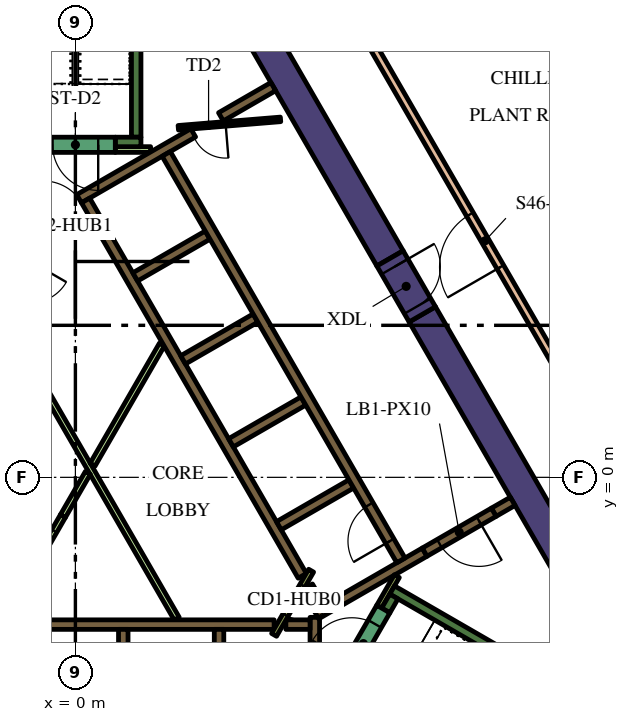
"""IFC4 building model, lengths in metres.
Left out: names, types, materials, properties, quantities, classifications, styles, units other than length and angle.
Written with IfcOpenShell. Run it as: python <this file> out.ifc"""

import sys

from ifc_helpers import new_model, si_unit, direction, frame, frame_2d, origin, place, context, subcontext, project, spatial, rectangle, extrude, element, fill, save


model = new_model("IFC4")
c1 = context("Model", 3, precision=1e-05, world=origin(), true_north=direction((0.0, 1.0)))
c2 = subcontext(c1, "Body", "Model", "MODEL_VIEW")
j1 = project(units=[si_unit("LENGTHUNIT", "METRE"), si_unit("PLANEANGLEUNIT", "RADIAN")], contexts=[c1])
p1 = place(None, origin())
s1 = spatial("IfcSite", under=j1, at=p1, CompositionType="ELEMENT")
p2 = place(p1, origin())
s2 = spatial("IfcBuilding", under=s1, at=p2, CompositionType="ELEMENT")
p3 = place(p2, frame((0.0, 0.0, 196.2)))
s3 = spatial("IfcBuildingStorey", under=s2, at=p3, CompositionType="ELEMENT", Elevation=196.2)
p4 = place(p3, frame((9.129, 4.289, 0.0), z_axis=(0.0, 0.0, 1.0), x_axis=(0.499995742806, -0.866027861663, 0.0)))
e1 = element("IfcWall", 1, at=p4, inside=s3, PredefinedType="SOLIDWALL", context=c2, shape_type="SweptSolid", body=[
    extrude(rectangle(XDim=12.527, YDim=0.8, at=frame_2d((6.264, 0.0))), origin(), (0.0, 0.0, 1.0), 5.4),
])
p5 = place(p3, frame((8.279, 5.761, 0.0), z_axis=(0.0, 0.0, 1.0), x_axis=(-0.500010359015, 0.866019422922, 0.0)))
e2 = element("IfcWall", 2, at=p5, inside=s3, PredefinedType="SOLIDWALL", context=c2, shape_type="SweptSolid", body=[
    extrude(rectangle(XDim=12.528, YDim=0.8, at=frame_2d((6.264, 0.0))), origin(), (0.0, 0.0, 1.0), 5.4),
])
p6 = place(p3, frame((8.334, -2.964, 0.0), z_axis=(0.0, 0.0, 1.0), x_axis=(0.866016039709, -0.500016218704, 0.0)))
e3 = element("IfcWall", 3, at=p6, inside=s3, PredefinedType="SOLIDWALL", context=c2, shape_type="SweptSolid", body=[
    extrude(rectangle(XDim=7.05, YDim=0.25, at=frame_2d((3.525, 0.0))), origin(), (0.0, 0.0, 1.0), 5.4),
])
p7 = place(p3, frame((8.168, -3.503, 0.0), z_axis=(0.0, 0.0, 1.0), x_axis=(0.49972245349, 0.866185586049, 0.0)))
e4 = element("IfcWall", 4, at=p7, inside=s3, PredefinedType="SOLIDWALL", context=c2, shape_type="SweptSolid", body=[
    extrude(rectangle(XDim=0.425, YDim=0.25, at=frame_2d((0.212, 0.0))), origin(), (0.0, 0.0, 1.0), 5.4),
])
p8 = place(p3, frame((1.6, 8.95, 0.0), z_axis=(0.0, 0.0, 1.0), x_axis=(0.0, 1.0, 0.0)))
e5 = element("IfcWall", 5, at=p8, inside=s3, PredefinedType="SOLIDWALL", context=c2, shape_type="SweptSolid", body=[
    extrude(rectangle(XDim=6.8, YDim=0.25, at=frame_2d((3.4, 0.0))), origin(), (0.0, 0.0, 1.0), 5.4),
])
p9 = place(p3, frame((1.05, 8.825, 0.0), z_axis=(0.0, 0.0, 1.0), x_axis=(1.0, 0.0, 0.0)))
e6 = element("IfcWall", 6, at=p9, inside=s3, PredefinedType="SOLIDWALL", context=c2, shape_type="SweptSolid", body=[
    extrude(rectangle(XDim=0.675, YDim=0.25, at=frame_2d((0.337, 0.0))), origin(), (0.0, 0.0, 1.0), 5.4),
])
p10 = place(p3, frame((-5.259, -3.875, 0.0), z_axis=(0.0, 0.0, 1.0), x_axis=(1.0, 0.0, 0.0)))
e7 = element("IfcWall", 7, at=p10, inside=s3, PredefinedType="SOLIDWALL", context=c2, shape_type="SweptSolid", body=[
    extrude(rectangle(XDim=10.489, YDim=0.25, at=frame_2d((5.244, 0.0))), origin(), (0.0, 0.0, 1.0), 5.4),
])
for number, where, z_axis, x_axis in (
    (8, (3.78, -4.0, 0.0), (0.0, 0.0, 1.0), (0.0, -1.0, 0.0)),
    (9, (1.26, -4.0, 0.0), (0.0, 0.0, 1.0), (0.0, -1.0, 0.0)),
):
    element("IfcWall", number, at=place(p3, frame(where, z_axis=z_axis, x_axis=x_axis)), inside=s3, PredefinedType="SOLIDWALL", context=c2, shape_type="SweptSolid", body=[
        extrude(rectangle(XDim=2.2, YDim=0.25, at=frame_2d((1.1, 0.0))), origin(), (0.0, 0.0, 1.0), 5.4),
    ])
p11 = place(p3, frame((6.3, -7.24, 0.0), z_axis=(0.0, 0.0, 1.0), x_axis=(0.0, 1.0, 0.0)))
e10 = element("IfcWall", 10, at=p11, inside=s3, PredefinedType="SOLIDWALL", context=c2, shape_type="SweptSolid", body=[
    extrude(rectangle(XDim=3.556, YDim=0.25, at=frame_2d((1.778, 0.0))), origin(), (0.0, 0.0, 1.0), 5.4),
])
p12 = place(p3, frame((5.538, -3.875, 0.0), z_axis=(0.0, 0.0, 1.0), x_axis=(1.0, 0.0, 0.0)))
e11 = element("IfcWall", 11, at=p12, inside=s3, PredefinedType="SOLIDWALL", context=c2, shape_type="SweptSolid", body=[
    extrude(rectangle(XDim=0.637, YDim=0.25, at=frame_2d((0.318, 0.0))), origin(), (0.0, 0.0, 1.0), 5.4),
])
p13 = place(p3, frame((9.19, -1.969, 0.0), z_axis=(0.0, 0.0, 1.0), x_axis=(-0.866057109641, -0.499945079824, 0.0)))
e12 = element("IfcWall", 12, at=p13, inside=s3, PredefinedType="SOLIDWALL", context=c2, shape_type="SweptSolid", body=[
    extrude(rectangle(XDim=3.291, YDim=0.25, at=frame_2d((1.646, 0.0))), origin(), (0.0, 0.0, 1.0), 5.4),
])
p14 = place(p3, frame((6.13, -2.867, 0.0), z_axis=(0.0, 0.0, 1.0), x_axis=(0.500160776593, -0.865932559475, 0.0)))
e13 = element("IfcWall", 13, at=p14, inside=s3, PredefinedType="SOLIDWALL", context=c2, shape_type="SweptSolid", body=[
    extrude(rectangle(XDim=0.627, YDim=0.25, at=frame_2d((0.313, 0.0))), origin(), (0.0, 0.0, 1.0), 5.4),
])
p15 = place(p3, frame((11.507, -0.631, 0.0), z_axis=(0.0, 0.0, 1.0), x_axis=(-0.866093731455, -0.499881634324, 0.0)))
e14 = element("IfcWall", 14, at=p15, inside=s3, PredefinedType="SOLIDWALL", context=c2, shape_type="SweptSolid", body=[
    extrude(rectangle(XDim=0.575, YDim=0.25, at=frame_2d((0.288, 0.0))), origin(), (0.0, 0.0, 1.0), 5.4),
])
p16 = place(p3, frame((3.1, 9.064, 0.0), z_axis=(0.0, 0.0, 1.0), x_axis=(-0.866033137035, -0.499986605379, 0.0)))
e15 = element("IfcWall", 15, at=p16, inside=s3, PredefinedType="SOLIDWALL", context=c2, shape_type="SweptSolid", body=[
    extrude(rectangle(XDim=3.467, YDim=0.25, at=frame_2d((1.733, 0.0))), origin(), (0.0, 0.0, 1.0), 5.4),
])
p17 = place(p3, frame((0.268, 7.285, 0.0), z_axis=(0.0, 0.0, 1.0), x_axis=(0.500098681536, -0.865968422476, 0.0)))
e16 = element("IfcWall", 16, at=p17, inside=s3, PredefinedType="SOLIDWALL", context=c2, shape_type="SweptSolid", body=[
    extrude(rectangle(XDim=0.636, YDim=0.25, at=frame_2d((0.318, 0.0))), origin(), (0.0, 0.0, 1.0), 5.4),
])
p18 = place(p3, frame((5.97, -2.591, 0.0), z_axis=(0.0, 0.0, 1.0), x_axis=(-0.499994469932, 0.866028596547, 0.0)))
e17 = element("IfcWall", 17, at=p18, inside=s3, PredefinedType="SOLIDWALL", context=c2, shape_type="SweptSolid", body=[
    extrude(rectangle(XDim=10.488, YDim=0.25, at=frame_2d((5.244, 0.0))), origin(), (0.0, 0.0, 1.0), 5.4),
])
p19 = place(p3, frame((1.574, 5.274, 0.0), z_axis=(0.0, 0.0, 1.0), x_axis=(0.866028486751, 0.499994660107, 0.0)))
e18 = element("IfcWall", 18, at=p19, inside=s3, PredefinedType="SOLIDWALL", context=c2, shape_type="SweptSolid", body=[
    extrude(rectangle(XDim=2.2, YDim=0.25, at=frame_2d((1.1, 0.0))), origin(), (0.0, 0.0, 1.0), 5.4),
])
for number, where, z_axis, x_axis in (
    (19, (2.834, 3.091, 0.0), (0.0, 0.0, 1.0), (0.866, 0.5, 0.0)),
    (20, (4.094, 0.909, 0.0), (0.0, 0.0, 1.0), (0.866, 0.5, 0.0)),
    (21, (5.354, -1.274, 0.0), (0.0, 0.0, 1.0), (0.866, 0.5, 0.0)),
):
    element("IfcWall", number, at=place(p3, frame(where, z_axis=z_axis, x_axis=x_axis)), inside=s3, PredefinedType="SOLIDWALL", context=c2, shape_type="SweptSolid", body=[
        extrude(rectangle(XDim=2.2, YDim=0.25, at=frame_2d((1.1, 0.0))), origin(), (0.0, 0.0, 1.0), 5.4),
    ])
p20 = place(p3, frame((3.83, 9.486, 0.0), z_axis=(0.0, 0.0, 1.0), x_axis=(0.865986202621, 0.500067892261, 0.0)))
e22 = element("IfcWall", 22, at=p20, inside=s3, PredefinedType="SOLIDWALL", context=c2, shape_type="SweptSolid", body=[
    extrude(rectangle(XDim=1.591, YDim=0.25, at=frame_2d((0.795, 0.0))), origin(), (0.0, 0.0, 1.0), 5.4),
])
p21 = place(p3, frame((1.05, 8.625, 0.0), z_axis=(0.0, 0.0, 1.0), x_axis=(1.0, 0.0, 0.0)))
e23 = element("IfcWall", 23, at=p21, inside=s3, PredefinedType="PARTITIONING", context=c2, shape_type="SweptSolid", body=[
    extrude(rectangle(XDim=0.929, YDim=0.15, at=frame_2d((0.464, 0.0))), origin(), (0.0, 0.0, 1.0), 4.65),
])
p22 = place(p3, frame((8.459, -2.599, 0.0), z_axis=(0.0, 0.0, 1.0), x_axis=(-0.500041054325, -0.866001699761, 0.0)))
e24 = element("IfcWall", 24, at=p22, inside=s3, PredefinedType="PARTITIONING", context=c2, shape_type="SweptSolid", body=[
    extrude(rectangle(XDim=0.929, YDim=0.15, at=frame_2d((0.464, 0.0))), origin(), (0.0, 0.0, 1.0), 5.4),
])
p23 = place(p3, frame((-1.887, 4.168, 0.0), z_axis=(0.0, 0.0, 1.0), x_axis=(0.499997069472, -0.866027095719, 0.0)))
e25 = element("IfcWall", 25, at=p23, inside=s3, PredefinedType="PARTITIONING", context=c2, shape_type="SweptSolid", body=[
    extrude(rectangle(XDim=9.106, YDim=0.15, at=frame_2d((4.553, 0.0))), origin(), (0.0, 0.0, 1.0), 4.65),
])
p24 = place(p3, frame((-0.329, -1.021, 0.0), z_axis=(0.0, 0.0, 1.0), x_axis=(0.500033191285, 0.866006239939, 0.0)))
e26 = element("IfcWall", 26, at=p24, inside=s3, PredefinedType="PARTITIONING", context=c2, shape_type="SweptSolid", body=[
    extrude(rectangle(XDim=1.315, YDim=0.15, at=frame_2d((0.657, 0.0))), origin(), (0.0, 0.0, 1.0), 4.65),
])
p25 = place(p3, frame((2.277, 3.493, 0.0), z_axis=(0.0, 0.0, 1.0), x_axis=(-0.499994550825, -0.866028549844, 0.0)))
e27 = element("IfcWall", 27, at=p25, inside=s3, PredefinedType="PARTITIONING", context=c2, shape_type="SweptSolid", body=[
    extrude(rectangle(XDim=3.65, YDim=0.15, at=frame_2d((1.825, 0.0))), origin(), (0.0, 0.0, 1.0), 4.65),
])
p26 = place(p3, frame((8.565, -2.185, 0.0), z_axis=(0.0, 0.0, 1.0), x_axis=(-0.499997954832, 0.866026584559, 0.0)))
e28 = element("IfcWall", 28, at=p26, inside=s3, PredefinedType="SOLIDWALL", context=c2, shape_type="SweptSolid", body=[
    extrude(rectangle(XDim=12.35, YDim=0.25, at=frame_2d((6.175, 0.0))), origin(), (0.0, 0.0, 1.0), 5.4),
])
p27 = place(p26, frame((0.585, 0.0, 0.0)))
e29 = element("IfcOpeningElement", 29, at=p27, cuts=e28, PredefinedType="OPENING", context=c2, shape_type="SweptSolid", body=[
    extrude(rectangle(XDim=1.1, YDim=2.1, at=frame_2d((0.55, 1.05))), frame((0.0, 0.135, 0.0), z_axis=(0.0, -1.0, 0.0), x_axis=(1.0, 0.0, 0.0)), (0.0, 0.0, 1.0), 0.27),
])
p28 = place(p3, frame((7.053, -5.284, 0.0), z_axis=(0.0, 0.0, 1.0), x_axis=(0.500078061341, 0.865980330357, 0.0)))
e30 = element("IfcWall", 30, at=p28, inside=s3, PredefinedType="SOLIDWALL", context=c2, shape_type="SweptSolid", body=[
    extrude(rectangle(XDim=2.1, YDim=0.4, at=frame_2d((1.05, 0.0))), origin(), (0.0, 0.0, 1.0), 5.4),
])
p29 = place(p28, frame((0.45, 0.0, 0.0)))
e31 = element("IfcOpeningElement", 31, at=p29, cuts=e30, PredefinedType="OPENING", context=c2, shape_type="SweptSolid", body=[
    extrude(rectangle(XDim=1.2, YDim=2.1, at=frame_2d((0.6, 1.05))), frame((0.0, 0.21, 0.0), z_axis=(0.0, -1.0, 0.0), x_axis=(1.0, 0.0, 0.0)), (0.0, 0.0, 1.0), 0.42),
])
p30 = place(p3, frame((1.05, 8.75, 0.0), z_axis=(0.0, 0.0, 1.0), x_axis=(-1.0, 0.0, 0.0)))
e32 = element("IfcWall", 32, at=p30, inside=s3, PredefinedType="SOLIDWALL", context=c2, shape_type="SweptSolid", body=[
    extrude(rectangle(XDim=2.1, YDim=0.4, at=frame_2d((1.05, 0.0))), origin(), (0.0, 0.0, 1.0), 5.4),
])
p31 = place(p30, frame((0.45, 0.0, 0.0)))
e33 = element("IfcOpeningElement", 33, at=p31, cuts=e32, PredefinedType="OPENING", context=c2, shape_type="SweptSolid", body=[
    extrude(rectangle(XDim=1.2, YDim=2.1, at=frame_2d((0.6, 1.05))), frame((0.0, 0.21, 0.0), z_axis=(0.0, -1.0, 0.0), x_axis=(1.0, 0.0, 0.0)), (0.0, 0.0, 1.0), 0.42),
])
p32 = place(p3, frame((5.398, 9.419, 0.0), z_axis=(0.0, 0.0, 1.0), x_axis=(-0.996653416376, -0.081743303248, 0.0)))
e34 = element("IfcWall", 34, at=p32, inside=s3, PredefinedType="PARTITIONING", context=c2, shape_type="SweptSolid", body=[
    extrude(rectangle(XDim=2.7, YDim=0.12, at=frame_2d((1.35, 0.0))), origin(), (0.0, 0.0, 1.0), 4.65),
])
p33 = place(p32, frame((1.45, 0.0, 0.0)))
e35 = element("IfcOpeningElement", 35, at=p33, cuts=e34, PredefinedType="OPENING", context=c2, shape_type="SweptSolid", body=[
    extrude(rectangle(XDim=0.9, YDim=2.1, at=frame_2d((0.45, 1.05))), frame((0.0, 0.07, 0.0), z_axis=(0.0, -1.0, 0.0), x_axis=(1.0, 0.0, 0.0)), (0.0, 0.0, 1.0), 0.14),
])
p34 = place(p3, frame((6.203, -2.456, 0.0), z_axis=(0.0, 0.0, 1.0), x_axis=(-0.500043961785, -0.866000020948, 0.0)))
e36 = element("IfcWall", 36, at=p34, inside=s3, PredefinedType="PARTITIONING", context=c2, shape_type="SweptSolid", body=[
    extrude(rectangle(XDim=1.95, YDim=0.15, at=frame_2d((0.975, 0.0))), origin(), (0.0, 0.0, 1.0), 5.4),
])
p35 = place(p34, frame((0.45, 0.0, 0.0)))
e37 = element("IfcOpeningElement", 37, at=p35, cuts=e36, PredefinedType="OPENING", context=c2, shape_type="SweptSolid", body=[
    extrude(rectangle(XDim=0.9, YDim=2.1, at=frame_2d((0.45, 1.05))), frame((0.0, 0.085, 0.0), z_axis=(0.0, -1.0, 0.0), x_axis=(1.0, 0.0, 0.0)), (0.0, 0.0, 1.0), 0.17),
])
p36 = place(p3, frame((-1.303, 6.6, 0.0), z_axis=(0.0, 0.0, 1.0), x_axis=(1.0, 0.0, 0.0)))
e38 = element("IfcWall", 38, at=p36, inside=s3, PredefinedType="PARTITIONING", context=c2, shape_type="SweptSolid", body=[
    extrude(rectangle(XDim=2.1, YDim=0.15, at=frame_2d((1.05, 0.0))), origin(), (0.0, 0.0, 1.0), 5.4),
])
p37 = place(p36, frame((0.45, 0.0, 0.0)))
e39 = element("IfcOpeningElement", 39, at=p37, cuts=e38, PredefinedType="OPENING", context=c2, shape_type="SweptSolid", body=[
    extrude(rectangle(XDim=1.2, YDim=2.1, at=frame_2d((0.6, 1.05))), frame((0.0, 0.085, 0.0), z_axis=(0.0, -1.0, 0.0), x_axis=(1.0, 0.0, 0.0)), (0.0, 0.0, 1.0), 0.17),
])
p38 = place(p3, frame((11.009, -0.919, 0.0), z_axis=(0.0, 0.0, 1.0), x_axis=(-0.866059744384, -0.49994051562, 0.0)))
e40 = element("IfcWall", 40, at=p38, inside=s3, PredefinedType="SOLIDWALL", context=c2, shape_type="SweptSolid", body=[
    extrude(rectangle(XDim=2.1, YDim=0.25, at=frame_2d((1.05, 0.0))), origin(), (0.0, 0.0, 1.0), 5.4),
])
p39 = place(p38, frame((0.45, 0.0, 0.0)))
e41 = element("IfcOpeningElement", 41, at=p39, cuts=e40, PredefinedType="OPENING", context=c2, shape_type="SweptSolid", body=[
    extrude(rectangle(XDim=1.2, YDim=2.1, at=frame_2d((0.6, 1.05))), frame((0.0, 0.135, 0.0), z_axis=(0.0, -1.0, 0.0), x_axis=(1.0, 0.0, 0.0)), (0.0, 0.0, 1.0), 0.27),
])
p40 = place(p3, frame((8.279, 5.761, 0.0), z_axis=(0.0, 0.0, 1.0), x_axis=(0.500062241894, -0.865989465428, 0.0)))
e42 = element("IfcWall", 42, at=p40, inside=s3, PredefinedType="SOLIDWALL", context=c2, shape_type="SweptSolid", body=[
    extrude(rectangle(XDim=1.7, YDim=0.8, at=frame_2d((0.85, 0.0))), origin(), (0.0, 0.0, 1.0), 5.4),
])
p41 = place(p40, frame((0.25, 0.0, 0.0)))
e43 = element("IfcOpeningElement", 43, at=p41, cuts=e42, PredefinedType="OPENING", context=c2, shape_type="SweptSolid", body=[
    extrude(rectangle(XDim=1.2, YDim=2.1, at=frame_2d((0.6, 1.05))), frame((0.0, 0.41, 0.0), z_axis=(0.0, -1.0, 0.0), x_axis=(1.0, 0.0, 0.0)), (0.0, 0.0, 1.0), 0.82),
])
p42 = place(p3, frame((-1.229, -2.579, 0.0), z_axis=(0.0, 0.0, 1.0), x_axis=(0.500062916607, 0.865989075817, 0.0)))
e44 = element("IfcWall", 44, at=p42, inside=s3, PredefinedType="PARTITIONING", context=c2, shape_type="SweptSolid", body=[
    extrude(rectangle(XDim=1.8, YDim=0.15, at=frame_2d((0.9, 0.0))), origin(), (0.0, 0.0, 1.0), 4.65),
])
p43 = place(p42, frame((0.45, 0.0, 0.0)))
e45 = element("IfcOpeningElement", 45, at=p43, cuts=e44, PredefinedType="OPENING", context=c2, shape_type="SweptSolid", body=[
    extrude(rectangle(XDim=0.9, YDim=2.1, at=frame_2d((0.45, 1.05))), frame((0.0, 0.085, 0.0), z_axis=(0.0, -1.0, 0.0), x_axis=(1.0, 0.0, 0.0)), (0.0, 0.0, 1.0), 0.17),
])
p44 = place(p3, frame((13.858, 0.897, 0.0), z_axis=(0.0, 0.0, 1.0), x_axis=(-0.500005845305, 0.86602202897, 0.0)))
e46 = element("IfcWall", 46, at=p44, inside=s3, PredefinedType="PARTITIONING", context=c2, shape_type="SweptSolid", body=[
    extrude(rectangle(XDim=12.304, YDim=0.2, at=frame_2d((6.152, 0.0))), origin(), (0.0, 0.0, 1.0), 4.65),
])
p45 = place(p44, frame((5.352, 0.0, 0.0)))
e47 = element("IfcOpeningElement", 47, at=p45, cuts=e46, PredefinedType="OPENING", context=c2, shape_type="SweptSolid", body=[
    extrude(rectangle(XDim=1.6, YDim=2.1, at=frame_2d((0.8, 1.05))), frame((0.0, 0.11, 0.0), z_axis=(0.0, -1.0, 0.0), x_axis=(1.0, 0.0, 0.0)), (0.0, 0.0, 1.0), 0.22),
])
p46 = place(p27, origin())
e48 = element("IfcDoor", 48, at=p46, inside=s3, OperationType="DOUBLE_DOOR_SLIDING", PredefinedType="DOOR", context=c2, shape_type="SweptSolid", body=[
    extrude(rectangle(XDim=1.1, YDim=2.1, at=frame_2d((0.55, 1.05))), frame((0.0, 0.025, 0.0), z_axis=(0.0, -1.0, 0.0), x_axis=(1.0, 0.0, 0.0)), (0.0, 0.0, 1.0), 0.05),
])
fill(e29, e48)
p47 = place(p29, origin())
e49 = element("IfcDoor", 49, at=p47, inside=s3, OperationType="SINGLE_SWING_LEFT", PredefinedType="DOOR", context=c2, shape_type="SweptSolid", body=[
    extrude(rectangle(XDim=1.2, YDim=2.1, at=frame_2d((0.6, 1.05))), frame((0.0, 0.025, 0.0), z_axis=(0.0, -1.0, 0.0), x_axis=(1.0, 0.0, 0.0)), (0.0, 0.0, 1.0), 0.05),
])
fill(e31, e49)
p48 = place(p31, origin())
e50 = element("IfcDoor", 50, at=p48, inside=s3, OperationType="SINGLE_SWING_LEFT", PredefinedType="DOOR", context=c2, shape_type="SweptSolid", body=[
    extrude(rectangle(XDim=1.2, YDim=2.1, at=frame_2d((0.6, 1.05))), frame((0.0, 0.025, 0.0), z_axis=(0.0, -1.0, 0.0), x_axis=(1.0, 0.0, 0.0)), (0.0, 0.0, 1.0), 0.05),
])
fill(e33, e50)
p49 = place(p33, origin())
e51 = element("IfcDoor", 51, at=p49, inside=s3, OperationType="SINGLE_SWING_LEFT", PredefinedType="DOOR", context=c2, shape_type="SweptSolid", body=[
    extrude(rectangle(XDim=0.9, YDim=2.1, at=frame_2d((0.45, 1.05))), frame((0.0, 0.025, 0.0), z_axis=(0.0, -1.0, 0.0), x_axis=(1.0, 0.0, 0.0)), (0.0, 0.0, 1.0), 0.05),
])
fill(e35, e51)
p50 = place(p35, origin())
e52 = element("IfcDoor", 52, at=p50, inside=s3, OperationType="SINGLE_SWING_LEFT", PredefinedType="DOOR", context=c2, shape_type="SweptSolid", body=[
    extrude(rectangle(XDim=0.9, YDim=2.1, at=frame_2d((0.45, 1.05))), frame((0.0, 0.025, 0.0), z_axis=(0.0, -1.0, 0.0), x_axis=(1.0, 0.0, 0.0)), (0.0, 0.0, 1.0), 0.05),
])
fill(e37, e52)
p51 = place(p37, origin())
e53 = element("IfcDoor", 53, at=p51, inside=s3, OperationType="SINGLE_SWING_LEFT", PredefinedType="DOOR", context=c2, shape_type="SweptSolid", body=[
    extrude(rectangle(XDim=1.2, YDim=2.1, at=frame_2d((0.6, 1.05))), frame((0.0, 0.025, 0.0), z_axis=(0.0, -1.0, 0.0), x_axis=(1.0, 0.0, 0.0)), (0.0, 0.0, 1.0), 0.05),
])
fill(e39, e53)
p52 = place(p39, origin())
e54 = element("IfcDoor", 54, at=p52, inside=s3, OperationType="SINGLE_SWING_LEFT", PredefinedType="DOOR", context=c2, shape_type="SweptSolid", body=[
    extrude(rectangle(XDim=1.2, YDim=2.1, at=frame_2d((0.6, 1.05))), frame((0.0, 0.025, 0.0), z_axis=(0.0, -1.0, 0.0), x_axis=(1.0, 0.0, 0.0)), (0.0, 0.0, 1.0), 0.05),
])
fill(e41, e54)
p53 = place(p41, origin())
e55 = element("IfcDoor", 55, at=p53, inside=s3, OperationType="SINGLE_SWING_LEFT", PredefinedType="DOOR", context=c2, shape_type="SweptSolid", body=[
    extrude(rectangle(XDim=1.2, YDim=2.1, at=frame_2d((0.6, 1.05))), frame((0.0, 0.025, 0.0), z_axis=(0.0, -1.0, 0.0), x_axis=(1.0, 0.0, 0.0)), (0.0, 0.0, 1.0), 0.05),
])
fill(e43, e55)
p54 = place(p43, origin())
e56 = element("IfcDoor", 56, at=p54, inside=s3, OperationType="SINGLE_SWING_LEFT", PredefinedType="DOOR", context=c2, shape_type="SweptSolid", body=[
    extrude(rectangle(XDim=0.9, YDim=2.1, at=frame_2d((0.45, 1.05))), frame((0.0, 0.025, 0.0), z_axis=(0.0, -1.0, 0.0), x_axis=(1.0, 0.0, 0.0)), (0.0, 0.0, 1.0), 0.05),
])
fill(e45, e56)
p55 = place(p45, origin())
e57 = element("IfcDoor", 57, at=p55, inside=s3, OperationType="DOUBLE_DOOR_SINGLE_SWING", PredefinedType="DOOR", context=c2, shape_type="SweptSolid", body=[
    extrude(rectangle(XDim=1.6, YDim=2.1, at=frame_2d((0.8, 1.05))), frame((0.0, 0.025, 0.0), z_axis=(0.0, -1.0, 0.0), x_axis=(1.0, 0.0, 0.0)), (0.0, 0.0, 1.0), 0.05),
])
fill(e47, e57)
save(model, sys.argv[1])
